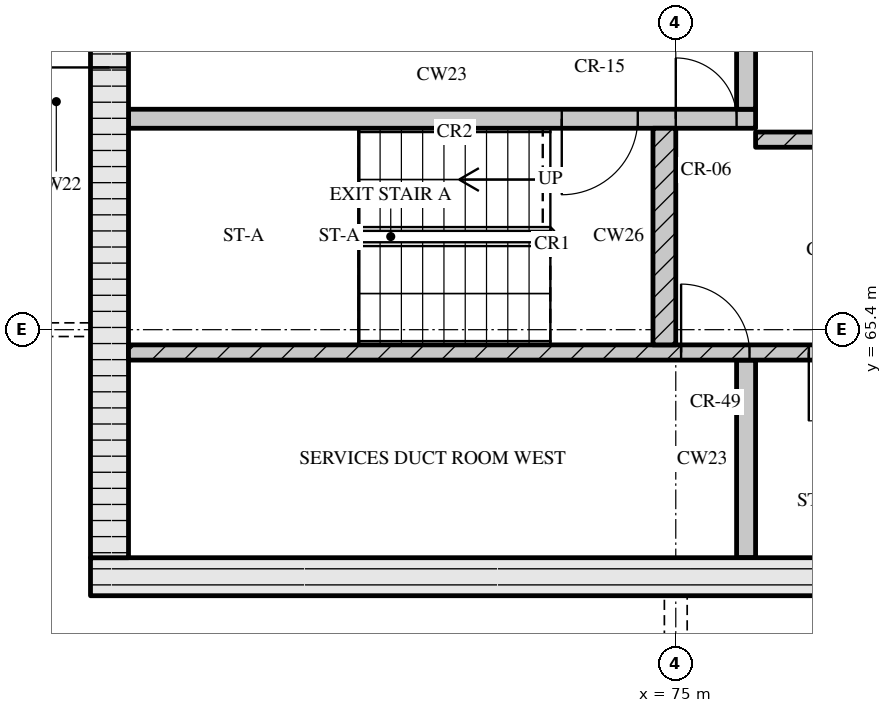
"""IFC4 building model, lengths in metres.
Left out: names, types, materials, properties, quantities, classifications, styles, units other than length and angle.
Written with IfcOpenShell. Run it as: python <this file> out.ifc"""

import sys

from ifc_helpers import new_model, si_unit, direction, frame, frame_2d, origin, place, context, subcontext, project, spatial, rectangle, extrude, element, fill, save


model = new_model("IFC4")
c1 = context("Model", 3, precision=1e-05, world=origin(), true_north=direction((0.0, 1.0)))
c2 = subcontext(c1, "Body", "Model", "MODEL_VIEW")
j1 = project(units=[si_unit("LENGTHUNIT", "METRE"), si_unit("PLANEANGLEUNIT", "RADIAN")], contexts=[c1])
p1 = place(None, origin())
s1 = spatial("IfcSite", under=j1, at=p1, CompositionType="ELEMENT")
p2 = place(p1, origin())
s2 = spatial("IfcBuilding", under=s1, at=p2, CompositionType="ELEMENT")
p3 = place(p2, frame((0.0, 0.0, 295.95)))
s3 = spatial("IfcBuildingStorey", under=s2, at=p3, CompositionType="ELEMENT", Elevation=295.95)
p4 = place(p3, frame((67.3, 62.15, 0.0), z_axis=(0.0, 0.0, 1.0), x_axis=(1.0, 0.0, 0.0)))
e1 = element("IfcWall", 1, at=p4, inside=s3, PredefinedType="SOLIDWALL", context=c2, shape_type="SweptSolid", body=[
    extrude(rectangle(XDim=40.6, YDim=0.5, at=frame_2d((20.3, 0.0))), origin(), (0.0, 0.0, 1.0), 3.32),
])
p5 = place(p4, frame((20.65, 0.0, 0.0)))
e2 = element("IfcOpeningElement", 2, at=p5, cuts=e1, PredefinedType="OPENING", context=c2, shape_type="SweptSolid", body=[
    extrude(rectangle(XDim=1.8, YDim=2.1, at=frame_2d((0.9, 1.05))), frame((0.0, 0.26, 0.0), z_axis=(0.0, -1.0, 0.0), x_axis=(1.0, 0.0, 0.0)), (0.0, 0.0, 1.0), 0.52),
])
p6 = place(p3, frame((67.55, 62.4, 0.0), z_axis=(0.0, 0.0, 1.0), x_axis=(0.0, 1.0, 0.0)))
e3 = element("IfcWall", 3, at=p6, inside=s3, PredefinedType="SOLIDWALL", context=c2, shape_type="SweptSolid", body=[
    extrude(rectangle(XDim=12.0, YDim=0.5, at=frame_2d((6.0, 0.0))), origin(), (0.0, 0.0, 1.0), 3.32),
])
p7 = place(p6, frame((6.45, 0.0, 0.0)))
e4 = element("IfcOpeningElement", 4, at=p7, cuts=e3, PredefinedType="OPENING", context=c2, shape_type="SweptSolid", body=[
    extrude(rectangle(XDim=1.2, YDim=2.1, at=frame_2d((0.6, 1.05))), frame((0.0, 0.26, 0.0), z_axis=(0.0, -1.0, 0.0), x_axis=(1.0, 0.0, 0.0)), (0.0, 0.0, 1.0), 0.52),
])
p8 = place(p3, frame((75.925, 62.4, 0.0), z_axis=(0.0, 0.0, 1.0), x_axis=(0.0, 1.0, 0.0)))
e5 = element("IfcWall", 5, at=p8, inside=s3, PredefinedType="SOLIDWALL", context=c2, shape_type="SweptSolid", body=[
    extrude(rectangle(XDim=2.6, YDim=0.25, at=frame_2d((1.3, 0.0))), origin(), (0.0, 0.0, 1.0), 3.32),
])
p9 = place(p3, frame((67.8, 65.1, 0.0), z_axis=(0.0, 0.0, 1.0), x_axis=(1.0, 0.0, 0.0)))
e6 = element("IfcWall", 6, at=p9, inside=s3, PredefinedType="SOLIDWALL", context=c2, shape_type="SweptSolid", body=[
    extrude(rectangle(XDim=18.5, YDim=0.2, at=frame_2d((9.25, 0.0))), origin(), (0.0, 0.0, 1.0), 3.32),
])
p10 = place(p9, frame((7.27, 0.0, 0.0)))
e7 = element("IfcOpeningElement", 7, at=p10, cuts=e6, PredefinedType="OPENING", context=c2, shape_type="SweptSolid", body=[
    extrude(rectangle(XDim=0.9, YDim=2.1, at=frame_2d((0.45, 1.05))), frame((0.0, 0.11, 0.0), z_axis=(0.0, -1.0, 0.0), x_axis=(1.0, 0.0, 0.0)), (0.0, 0.0, 1.0), 0.22),
])
p11 = place(p9, frame((8.95, 0.0, 0.0)))
e8 = element("IfcOpeningElement", 8, at=p11, cuts=e6, PredefinedType="OPENING", context=c2, shape_type="SweptSolid", body=[
    extrude(rectangle(XDim=0.9, YDim=2.1, at=frame_2d((0.45, 1.05))), frame((0.0, 0.11, 0.0), z_axis=(0.0, -1.0, 0.0), x_axis=(1.0, 0.0, 0.0)), (0.0, 0.0, 1.0), 0.22),
])
p12 = place(p9, frame((11.42, 0.0, 0.0)))
e9 = element("IfcOpeningElement", 9, at=p12, cuts=e6, PredefinedType="OPENING", context=c2, shape_type="SweptSolid", body=[
    extrude(rectangle(XDim=0.9, YDim=2.1, at=frame_2d((0.45, 1.05))), frame((0.0, 0.11, 0.0), z_axis=(0.0, -1.0, 0.0), x_axis=(1.0, 0.0, 0.0)), (0.0, 0.0, 1.0), 0.22),
])
p13 = place(p9, frame((13.92, 0.0, 0.0)))
e10 = element("IfcOpeningElement", 10, at=p13, cuts=e6, PredefinedType="OPENING", context=c2, shape_type="SweptSolid", body=[
    extrude(rectangle(XDim=0.9, YDim=2.1, at=frame_2d((0.45, 1.05))), frame((0.0, 0.11, 0.0), z_axis=(0.0, -1.0, 0.0), x_axis=(1.0, 0.0, 0.0)), (0.0, 0.0, 1.0), 0.22),
])
p14 = place(p9, frame((16.7, 0.0, 0.0)))
e11 = element("IfcOpeningElement", 11, at=p14, cuts=e6, PredefinedType="OPENING", context=c2, shape_type="SweptSolid", body=[
    extrude(rectangle(XDim=0.9, YDim=2.1, at=frame_2d((0.45, 1.05))), frame((0.0, 0.11, 0.0), z_axis=(0.0, -1.0, 0.0), x_axis=(1.0, 0.0, 0.0)), (0.0, 0.0, 1.0), 0.22),
])
p15 = place(p3, frame((74.85, 65.2, 0.0), z_axis=(0.0, 0.0, 1.0), x_axis=(0.0, 1.0, 0.0)))
e12 = element("IfcWall", 12, at=p15, inside=s3, PredefinedType="SOLIDWALL", context=c2, shape_type="SweptSolid", body=[
    extrude(rectangle(XDim=2.85, YDim=0.3, at=frame_2d((1.425, 0.0))), origin(), (0.0, 0.0, 1.0), 3.32),
])
p16 = place(p3, frame((76.05, 67.9, 0.0), z_axis=(0.0, 0.0, 1.0), x_axis=(1.0, 0.0, 0.0)))
e13 = element("IfcWall", 13, at=p16, inside=s3, PredefinedType="SOLIDWALL", context=c2, shape_type="SweptSolid", body=[
    extrude(rectangle(XDim=23.1, YDim=0.2, at=frame_2d((11.55, 0.0))), origin(), (0.0, 0.0, 1.0), 3.32),
])
p17 = place(p16, frame((1.95, 0.0, 0.0)))
e14 = element("IfcOpeningElement", 14, at=p17, cuts=e13, PredefinedType="OPENING", context=c2, shape_type="SweptSolid", body=[
    extrude(rectangle(XDim=0.9, YDim=2.1, at=frame_2d((0.45, 1.05))), frame((0.0, 0.11, 0.0), z_axis=(0.0, -1.0, 0.0), x_axis=(1.0, 0.0, 0.0)), (0.0, 0.0, 1.0), 0.22),
])
p18 = place(p16, frame((5.66, 0.0, 0.0)))
e15 = element("IfcOpeningElement", 15, at=p18, cuts=e13, PredefinedType="OPENING", context=c2, shape_type="SweptSolid", body=[
    extrude(rectangle(XDim=0.9, YDim=2.1, at=frame_2d((0.45, 1.05))), frame((0.0, 0.11, 0.0), z_axis=(0.0, -1.0, 0.0), x_axis=(1.0, 0.0, 0.0)), (0.0, 0.0, 1.0), 0.22),
])
p19 = place(p16, frame((9.7, 0.0, 0.0)))
e16 = element("IfcOpeningElement", 16, at=p19, cuts=e13, PredefinedType="OPENING", context=c2, shape_type="SweptSolid", body=[
    extrude(rectangle(XDim=0.9, YDim=2.1, at=frame_2d((0.45, 1.05))), frame((0.0, 0.11, 0.0), z_axis=(0.0, -1.0, 0.0), x_axis=(1.0, 0.0, 0.0)), (0.0, 0.0, 1.0), 0.22),
])
p20 = place(p16, frame((13.55, 0.0, 0.0)))
e17 = element("IfcOpeningElement", 17, at=p20, cuts=e13, PredefinedType="OPENING", context=c2, shape_type="SweptSolid", body=[
    extrude(rectangle(XDim=1.0, YDim=2.1, at=frame_2d((0.5, 1.05))), frame((0.0, 0.11, 0.0), z_axis=(0.0, -1.0, 0.0), x_axis=(1.0, 0.0, 0.0)), (0.0, 0.0, 1.0), 0.22),
])
p21 = place(p16, frame((16.2, 0.0, 0.0)))
e18 = element("IfcOpeningElement", 18, at=p21, cuts=e13, PredefinedType="OPENING", context=c2, shape_type="SweptSolid", body=[
    extrude(rectangle(XDim=1.1, YDim=2.1, at=frame_2d((0.55, 1.05))), frame((0.0, 0.11, 0.0), z_axis=(0.0, -1.0, 0.0), x_axis=(1.0, 0.0, 0.0)), (0.0, 0.0, 1.0), 0.22),
])
p22 = place(p16, frame((18.7, 0.0, 0.0)))
e19 = element("IfcOpeningElement", 19, at=p22, cuts=e13, PredefinedType="OPENING", context=c2, shape_type="SweptSolid", body=[
    extrude(rectangle(XDim=1.1, YDim=2.1, at=frame_2d((0.55, 1.05))), frame((0.0, 0.11, 0.0), z_axis=(0.0, -1.0, 0.0), x_axis=(1.0, 0.0, 0.0)), (0.0, 0.0, 1.0), 0.22),
])
p23 = place(p16, frame((21.2, 0.0, 0.0)))
e20 = element("IfcOpeningElement", 20, at=p23, cuts=e13, PredefinedType="OPENING", context=c2, shape_type="SweptSolid", body=[
    extrude(rectangle(XDim=1.1, YDim=2.1, at=frame_2d((0.55, 1.05))), frame((0.0, 0.11, 0.0), z_axis=(0.0, -1.0, 0.0), x_axis=(1.0, 0.0, 0.0)), (0.0, 0.0, 1.0), 0.22),
])
p24 = place(p3, frame((67.8, 68.175, 0.0), z_axis=(0.0, 0.0, 1.0), x_axis=(1.0, 0.0, 0.0)))
e21 = element("IfcWall", 21, at=p24, inside=s3, PredefinedType="SOLIDWALL", context=c2, shape_type="SweptSolid", body=[
    extrude(rectangle(XDim=8.25, YDim=0.25, at=frame_2d((4.125, 0.0))), origin(), (0.0, 0.0, 1.0), 3.32),
])
p25 = place(p24, frame((5.7, 0.0, 0.0)))
e22 = element("IfcOpeningElement", 22, at=p25, cuts=e21, PredefinedType="OPENING", context=c2, shape_type="SweptSolid", body=[
    extrude(rectangle(XDim=1.0, YDim=2.1, at=frame_2d((0.5, 1.05))), frame((0.0, 0.135, 0.0), z_axis=(0.0, -1.0, 0.0), x_axis=(1.0, 0.0, 0.0)), (0.0, 0.0, 1.0), 0.27),
])
p26 = place(p24, frame((7.2, 0.0, 0.0)))
e23 = element("IfcOpeningElement", 23, at=p26, cuts=e21, PredefinedType="OPENING", context=c2, shape_type="SweptSolid", body=[
    extrude(rectangle(XDim=0.8, YDim=2.1, at=frame_2d((0.4, 1.05))), frame((0.0, 0.135, 0.0), z_axis=(0.0, -1.0, 0.0), x_axis=(1.0, 0.0, 0.0)), (0.0, 0.0, 1.0), 0.27),
])
p27 = place(p3, frame((75.925, 68.3, 0.0), z_axis=(0.0, 0.0, 1.0), x_axis=(0.0, 1.0, 0.0)))
e24 = element("IfcWall", 24, at=p27, inside=s3, PredefinedType="SOLIDWALL", context=c2, shape_type="SweptSolid", body=[
    extrude(rectangle(XDim=2.3, YDim=0.25, at=frame_2d((1.15, 0.0))), origin(), (0.0, 0.0, 1.0), 3.32),
])
p28 = place(p10, origin())
e25 = element("IfcDoor", 25, at=p28, inside=s3, OperationType="SINGLE_SWING_LEFT", PredefinedType="DOOR", context=c2, shape_type="SweptSolid", body=[
    extrude(rectangle(XDim=0.9, YDim=2.1, at=frame_2d((0.45, 1.05))), frame((0.0, 0.025, 0.0), z_axis=(0.0, -1.0, 0.0), x_axis=(1.0, 0.0, 0.0)), (0.0, 0.0, 1.0), 0.05),
])
fill(e7, e25)
p29 = place(p11, origin())
e26 = element("IfcDoor", 26, at=p29, inside=s3, OperationType="SINGLE_SWING_RIGHT", PredefinedType="DOOR", context=c2, shape_type="SweptSolid", body=[
    extrude(rectangle(XDim=0.9, YDim=2.1, at=frame_2d((0.45, 1.05))), frame((0.0, 0.025, 0.0), z_axis=(0.0, -1.0, 0.0), x_axis=(1.0, 0.0, 0.0)), (0.0, 0.0, 1.0), 0.05),
])
fill(e8, e26)
p30 = place(p25, origin())
e27 = element("IfcDoor", 27, at=p30, inside=s3, OperationType="SINGLE_SWING_RIGHT", PredefinedType="DOOR", context=c2, shape_type="SweptSolid", body=[
    extrude(rectangle(XDim=1.0, YDim=2.1, at=frame_2d((0.5, 1.05))), frame((0.0, 0.025, 0.0), z_axis=(0.0, -1.0, 0.0), x_axis=(1.0, 0.0, 0.0)), (0.0, 0.0, 1.0), 0.05),
])
fill(e22, e27)
p31 = place(p26, origin())
e28 = element("IfcDoor", 28, at=p31, inside=s3, OperationType="SINGLE_SWING_LEFT", PredefinedType="DOOR", context=c2, shape_type="SweptSolid", body=[
    extrude(rectangle(XDim=0.8, YDim=2.1, at=frame_2d((0.4, 1.05))), frame((0.0, 0.025, 0.0), z_axis=(0.0, -1.0, 0.0), x_axis=(1.0, 0.0, 0.0)), (0.0, 0.0, 1.0), 0.05),
])
fill(e23, e28)
p32 = place(p7, origin())
e29 = element("IfcDoor", 29, at=p32, inside=s3, OperationType="SINGLE_SWING_LEFT", PredefinedType="DOOR", context=c2, shape_type="SweptSolid", body=[
    extrude(rectangle(XDim=1.2, YDim=2.1, at=frame_2d((0.6, 1.05))), frame((0.0, 0.025, 0.0), z_axis=(0.0, -1.0, 0.0), x_axis=(1.0, 0.0, 0.0)), (0.0, 0.0, 1.0), 0.05),
])
fill(e4, e29)
save(model, sys.argv[1])
